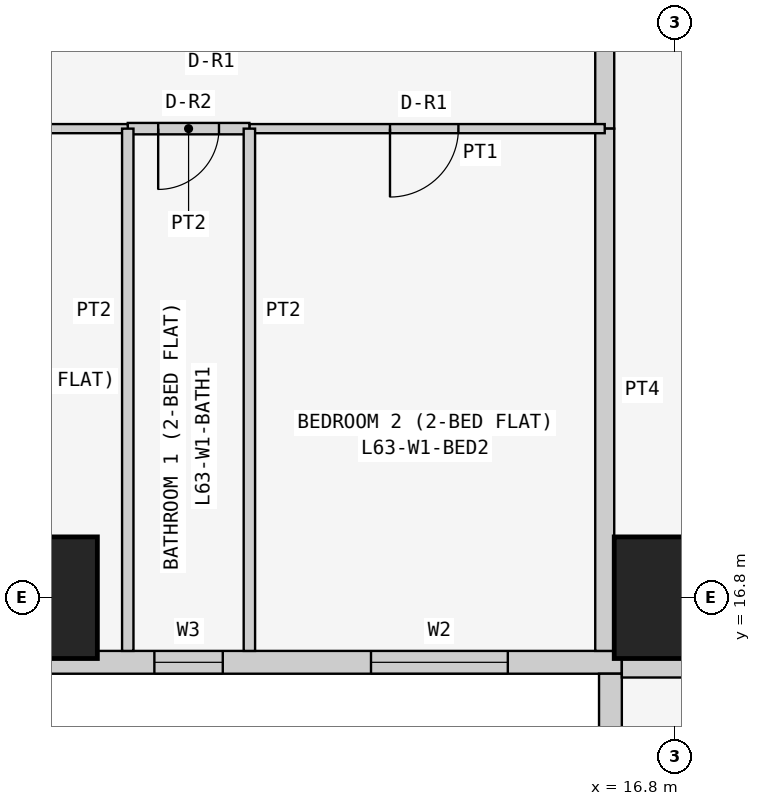
"""IFC4 building model, lengths in metres.
Left out: names, types, materials, properties, quantities, classifications, styles, units other than length and angle.
Written with IfcOpenShell. Run it as: python <this file> out.ifc"""

import sys

from ifc_helpers import new_model, si_unit, direction, frame, frame_2d, origin, origin_2d, place, context, subcontext, project, spatial, rectangle, extrude, element, fill, save


model = new_model("IFC4")
c1 = context("Model", 3, precision=1e-05, world=origin(), true_north=direction((0.0, 1.0)))
c2 = subcontext(c1, "Body", "Model", "MODEL_VIEW")
j1 = project(units=[si_unit("LENGTHUNIT", "METRE"), si_unit("PLANEANGLEUNIT", "RADIAN")], contexts=[c1])
p1 = place(None, origin())
s1 = spatial("IfcSite", under=j1, at=p1, CompositionType="ELEMENT")
p2 = place(p1, origin())
s2 = spatial("IfcBuilding", under=s1, at=p2, CompositionType="ELEMENT")
p3 = place(p2, frame((0.0, 0.0, 240.9)))
s3 = spatial("IfcBuildingStorey", under=s2, at=p3, CompositionType="ELEMENT", Elevation=240.9)
for number, where, z_axis, x_axis in (
    (1, (8.4, 16.8, 0.0), (0.0, 0.0, 1.0), (1.0, 0.0, 0.0)),
    (2, (16.8, 16.8, 0.0), (0.0, 0.0, 1.0), (1.0, 0.0, 0.0)),
):
    element("IfcColumn", number, at=place(p3, frame(where, z_axis=z_axis, x_axis=x_axis)), inside=s3, PredefinedType="COLUMN", context=c2, shape_type="SweptSolid", body=[
        extrude(rectangle(XDim=1.6, YDim=1.6, at=origin_2d()), origin(), (0.0, 0.0, 1.0), 3.6),
    ])
p4 = place(p3, frame((0.4, 15.95, 0.0), z_axis=(0.0, 0.0, 1.0), x_axis=(1.0, 0.0, 0.0)))
e3 = element("IfcWall", 3, at=p4, inside=s3, PredefinedType="SOLIDWALL", context=c2, shape_type="SweptSolid", body=[
    extrude(rectangle(XDim=15.7, YDim=0.3, at=frame_2d((7.85, 0.0))), origin(), (0.0, 0.0, 1.0), 3.45),
])
p5 = place(p4, frame((12.4, 0.0, 0.9)))
e4 = element("IfcOpeningElement", 4, at=p5, cuts=e3, PredefinedType="OPENING", context=c2, shape_type="SweptSolid", body=[
    extrude(rectangle(XDim=1.8, YDim=1.5, at=frame_2d((0.9, 0.75))), frame((0.0, 0.16, 0.0), z_axis=(0.0, -1.0, 0.0), x_axis=(1.0, 0.0, 0.0)), (0.0, 0.0, 1.0), 0.32),
])
p6 = place(p4, frame((9.55, 0.0, 1.5)))
e5 = element("IfcOpeningElement", 5, at=p6, cuts=e3, PredefinedType="OPENING", context=c2, shape_type="SweptSolid", body=[
    extrude(rectangle(XDim=0.9, YDim=0.7, at=frame_2d((0.45, 0.35))), frame((0.0, 0.16, 0.0), z_axis=(0.0, -1.0, 0.0), x_axis=(1.0, 0.0, 0.0)), (0.0, 0.0, 1.0), 0.32),
])
p7 = place(p4, frame((5.1, 0.0, 0.9)))
e6 = element("IfcOpeningElement", 6, at=p7, cuts=e3, PredefinedType="OPENING", context=c2, shape_type="SweptSolid", body=[
    extrude(rectangle(XDim=1.8, YDim=1.5, at=frame_2d((0.9, 0.75))), frame((0.0, 0.16, 0.0), z_axis=(0.0, -1.0, 0.0), x_axis=(1.0, 0.0, 0.0)), (0.0, 0.0, 1.0), 0.32),
])
p8 = place(p4, frame((2.0, 0.0, 0.0)))
e7 = element("IfcOpeningElement", 7, at=p8, cuts=e3, PredefinedType="OPENING", context=c2, shape_type="SweptSolid", body=[
    extrude(rectangle(XDim=0.9, YDim=2.4, at=frame_2d((0.45, 1.2))), frame((0.0, 0.16, 0.0), z_axis=(0.0, -1.0, 0.0), x_axis=(1.0, 0.0, 0.0)), (0.0, 0.0, 1.0), 0.32),
])
p9 = place(p4, frame((0.7, 0.0, 0.9)))
e8 = element("IfcOpeningElement", 8, at=p9, cuts=e3, PredefinedType="OPENING", context=c2, shape_type="SweptSolid", body=[
    extrude(rectangle(XDim=1.2, YDim=1.5, at=frame_2d((0.6, 0.75))), frame((0.0, 0.16, 0.0), z_axis=(0.0, -1.0, 0.0), x_axis=(1.0, 0.0, 0.0)), (0.0, 0.0, 1.0), 0.32),
])
p10 = place(p3, frame((15.95, 15.8, 0.0), z_axis=(0.0, 0.0, 1.0), x_axis=(0.0, -1.0, 0.0)))
e9 = element("IfcWall", 9, at=p10, inside=s3, PredefinedType="SOLIDWALL", context=c2, shape_type="SweptSolid", body=[
    extrude(rectangle(XDim=7.0, YDim=0.3, at=frame_2d((3.5, 0.0))), origin(), (0.0, 0.0, 1.0), 3.45),
])
p11 = place(p10, frame((1.5, 0.0, 0.9)))
e10 = element("IfcOpeningElement", 10, at=p11, cuts=e9, PredefinedType="OPENING", context=c2, shape_type="SweptSolid", body=[
    extrude(rectangle(XDim=2.4, YDim=1.5, at=frame_2d((1.2, 0.75))), frame((0.0, 0.16, 0.0), z_axis=(0.0, -1.0, 0.0), x_axis=(1.0, 0.0, 0.0)), (0.0, 0.0, 1.0), 0.32),
])
p12 = place(p10, frame((5.05, 0.0, 0.9)))
e11 = element("IfcOpeningElement", 11, at=p12, cuts=e9, PredefinedType="OPENING", context=c2, shape_type="SweptSolid", body=[
    extrude(rectangle(XDim=1.2, YDim=1.5, at=frame_2d((0.6, 0.75))), frame((0.0, 0.16, 0.0), z_axis=(0.0, -1.0, 0.0), x_axis=(1.0, 0.0, 0.0)), (0.0, 0.0, 1.0), 0.32),
])
p13 = place(p3, frame((22.971, 15.875, 0.0), z_axis=(0.0, 0.0, 1.0), x_axis=(-1.0, 0.0, 0.0)))
e12 = element("IfcWall", 12, at=p13, inside=s3, PredefinedType="PARTITIONING", context=c2, shape_type="SweptSolid", body=[
    extrude(rectangle(XDim=6.871, YDim=0.25, at=frame_2d((3.436, 0.0))), origin(), (0.0, 0.0, 1.0), 3.45),
])
p14 = place(p3, frame((15.875, 22.971, 0.0), z_axis=(0.0, 0.0, 1.0), x_axis=(0.0, 1.0, 0.0)))
e13 = element("IfcWall", 13, at=p14, inside=s3, PredefinedType="PARTITIONING", context=c2, shape_type="SweptSolid", body=[
    extrude(rectangle(XDim=1.2, YDim=0.25, at=frame_2d((0.6, 0.0))), origin(), (0.0, 0.0, 1.0), 3.45),
])
p15 = place(p3, frame((15.875, 16.1, 0.0), z_axis=(0.0, 0.0, 1.0), x_axis=(0.0, 1.0, 0.0)))
e14 = element("IfcWall", 14, at=p15, inside=s3, PredefinedType="PARTITIONING", context=c2, shape_type="SweptSolid", body=[
    extrude(rectangle(XDim=6.871, YDim=0.25, at=frame_2d((3.436, 0.0))), origin(), (0.0, 0.0, 1.0), 3.45),
])
p16 = place(p3, frame((11.2, 22.971, 0.0), z_axis=(0.0, 0.0, 1.0), x_axis=(1.0, 0.0, 0.0)))
e15 = element("IfcWall", 15, at=p16, inside=s3, PredefinedType="PARTITIONING", context=c2, shape_type="SweptSolid", body=[
    extrude(rectangle(XDim=4.675, YDim=0.12, at=frame_2d((2.337, 0.0))), origin(), (0.0, 0.0, 1.0), 3.45),
])
p17 = place(p16, frame((1.85, 0.0, 0.0)))
e16 = element("IfcOpeningElement", 16, at=p17, cuts=e15, PredefinedType="OPENING", context=c2, shape_type="SweptSolid", body=[
    extrude(rectangle(XDim=0.9, YDim=2.1, at=frame_2d((0.45, 1.05))), frame((0.0, 0.07, 0.0), z_axis=(0.0, -1.0, 0.0), x_axis=(1.0, 0.0, 0.0)), (0.0, 0.0, 1.0), 0.14),
])
p18 = place(p3, frame((9.6, 22.971, 0.0), z_axis=(0.0, 0.0, 1.0), x_axis=(1.0, 0.0, 0.0)))
e17 = element("IfcWall", 17, at=p18, inside=s3, PredefinedType="PARTITIONING", context=c2, shape_type="SweptSolid", body=[
    extrude(rectangle(XDim=1.6, YDim=0.15, at=frame_2d((0.8, 0.0))), origin(), (0.0, 0.0, 1.0), 3.45),
])
p19 = place(p18, frame((0.4, 0.0, 0.0)))
e18 = element("IfcOpeningElement", 18, at=p19, cuts=e17, PredefinedType="OPENING", context=c2, shape_type="SweptSolid", body=[
    extrude(rectangle(XDim=0.8, YDim=2.1, at=frame_2d((0.4, 1.05))), frame((0.0, 0.085, 0.0), z_axis=(0.0, -1.0, 0.0), x_axis=(1.0, 0.0, 0.0)), (0.0, 0.0, 1.0), 0.17),
])
p20 = place(p3, frame((5.8, 22.971, 0.0), z_axis=(0.0, 0.0, 1.0), x_axis=(1.0, 0.0, 0.0)))
e19 = element("IfcWall", 19, at=p20, inside=s3, PredefinedType="PARTITIONING", context=c2, shape_type="SweptSolid", body=[
    extrude(rectangle(XDim=3.8, YDim=0.12, at=frame_2d((1.9, 0.0))), origin(), (0.0, 0.0, 1.0), 3.45),
])
p21 = place(p20, frame((0.55, 0.0, 0.0)))
e20 = element("IfcOpeningElement", 20, at=p21, cuts=e19, PredefinedType="OPENING", context=c2, shape_type="SweptSolid", body=[
    extrude(rectangle(XDim=0.9, YDim=2.1, at=frame_2d((0.45, 1.05))), frame((0.0, 0.07, 0.0), z_axis=(0.0, -1.0, 0.0), x_axis=(1.0, 0.0, 0.0)), (0.0, 0.0, 1.0), 0.14),
])
for number, where, z_axis, x_axis in (
    (21, (11.2, 22.971, 0.0), (0.0, 0.0, 1.0), (0.0, -1.0, 0.0)),
    (22, (9.6, 22.971, 0.0), (0.0, 0.0, 1.0), (0.0, -1.0, 0.0)),
):
    element("IfcWall", number, at=place(p3, frame(where, z_axis=z_axis, x_axis=x_axis)), inside=s3, PredefinedType="PARTITIONING", context=c2, shape_type="SweptSolid", body=[
        extrude(rectangle(XDim=6.871, YDim=0.15, at=frame_2d((3.436, 0.0))), origin(), (0.0, 0.0, 1.0), 3.45),
    ])
p22 = place(p5, origin())
e23 = element("IfcWindow", 23, at=p22, inside=s3, PartitioningType="SINGLE_PANEL", PredefinedType="WINDOW", context=c2, shape_type="SweptSolid", body=[
    extrude(rectangle(XDim=1.8, YDim=1.5, at=frame_2d((0.9, 0.75))), frame((0.0, 0.03, 0.0), z_axis=(0.0, -1.0, 0.0), x_axis=(1.0, 0.0, 0.0)), (0.0, 0.0, 1.0), 0.06),
])
fill(e4, e23)
p23 = place(p6, origin())
e24 = element("IfcWindow", 24, at=p23, inside=s3, PartitioningType="SINGLE_PANEL", PredefinedType="WINDOW", context=c2, shape_type="SweptSolid", body=[
    extrude(rectangle(XDim=0.9, YDim=0.7, at=frame_2d((0.45, 0.35))), frame((0.0, 0.03, 0.0), z_axis=(0.0, -1.0, 0.0), x_axis=(1.0, 0.0, 0.0)), (0.0, 0.0, 1.0), 0.06),
])
fill(e5, e24)
p24 = place(p17, frame((0.9, 0.0, 0.0), z_axis=(0.0, 0.0, 1.0), x_axis=(-1.0, 0.0, 0.0)))
e25 = element("IfcDoor", 25, at=p24, inside=s3, OperationType="SINGLE_SWING_RIGHT", PredefinedType="DOOR", context=c2, shape_type="SweptSolid", body=[
    extrude(rectangle(XDim=0.9, YDim=2.1, at=frame_2d((0.45, 1.05))), frame((0.0, 0.025, 0.0), z_axis=(0.0, -1.0, 0.0), x_axis=(1.0, 0.0, 0.0)), (0.0, 0.0, 1.0), 0.05),
])
fill(e16, e25)
p25 = place(p19, frame((0.8, 0.0, 0.0), z_axis=(0.0, 0.0, 1.0), x_axis=(-1.0, 0.0, 0.0)))
e26 = element("IfcDoor", 26, at=p25, inside=s3, OperationType="SINGLE_SWING_RIGHT", PredefinedType="DOOR", context=c2, shape_type="SweptSolid", body=[
    extrude(rectangle(XDim=0.8, YDim=2.1, at=frame_2d((0.4, 1.05))), frame((0.0, 0.025, 0.0), z_axis=(0.0, -1.0, 0.0), x_axis=(1.0, 0.0, 0.0)), (0.0, 0.0, 1.0), 0.05),
])
fill(e18, e26)
save(model, sys.argv[1])
